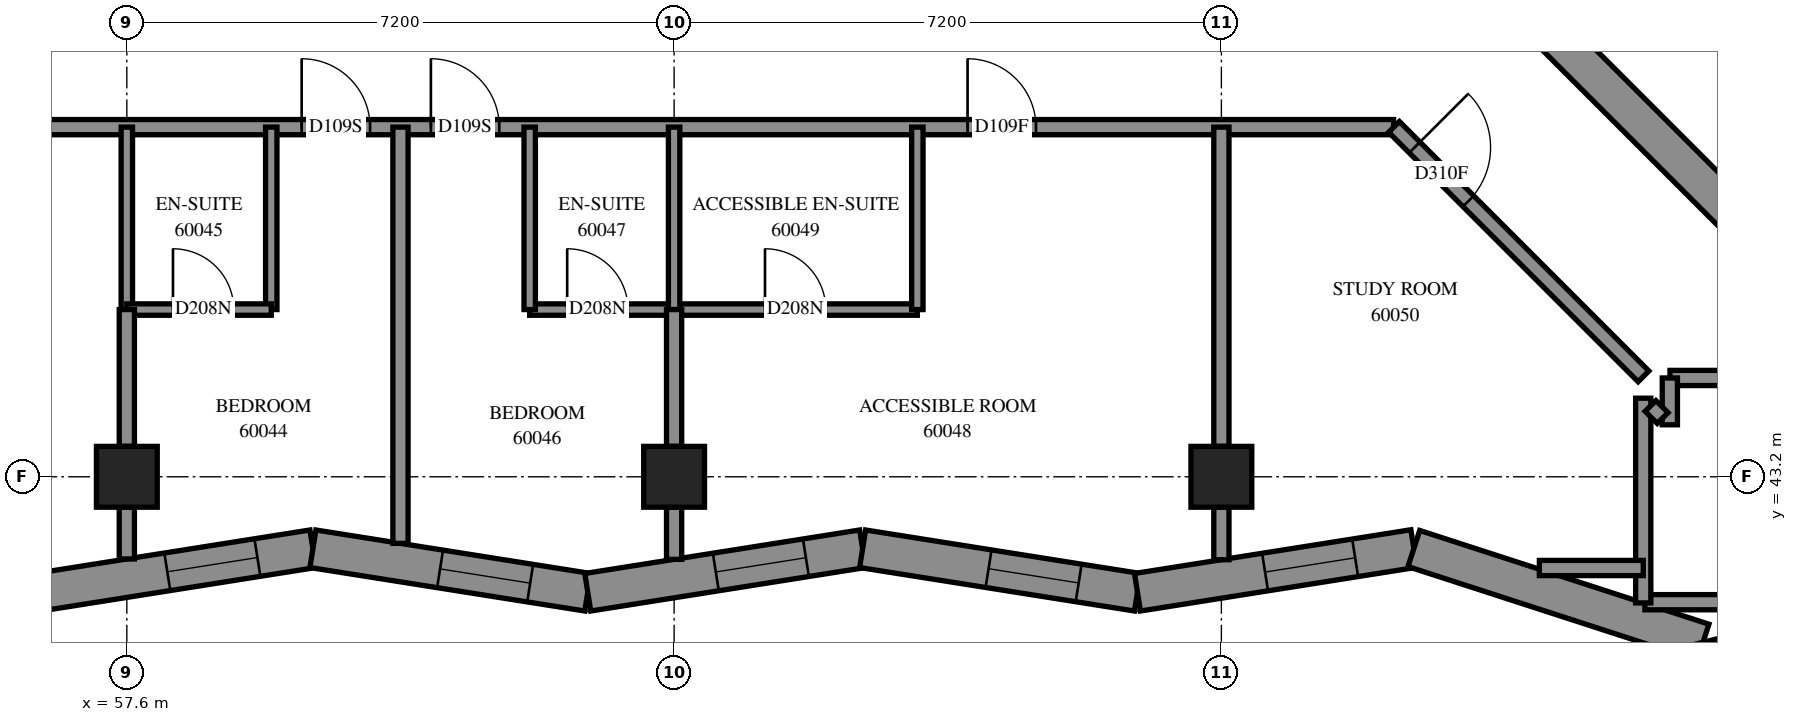
"""IFC4 building model, lengths in metres.
Left out: names, types, materials, properties, quantities, classifications, styles, units other than length and angle.
Written with IfcOpenShell. Run it as: python <this file> out.ifc"""

import sys

from ifc_helpers import new_model, si_unit, direction, frame, frame_2d, origin, origin_2d, place, context, subcontext, project, spatial, polyline, rectangle, outline, extrude, element, fill, save


model = new_model("IFC4")
c1 = context("Model", 3, precision=1e-05, world=origin(), true_north=direction((0.0, 1.0)))
c2 = subcontext(c1, "Body", "Model", "MODEL_VIEW")
j1 = project(units=[si_unit("LENGTHUNIT", "METRE"), si_unit("PLANEANGLEUNIT", "RADIAN")], contexts=[c1])
p1 = place(None, origin())
s1 = spatial("IfcSite", under=j1, at=p1, CompositionType="ELEMENT")
p2 = place(p1, origin())
s2 = spatial("IfcBuilding", under=s1, at=p2, CompositionType="ELEMENT")
p3 = place(p2, frame((0.0, 0.0, 220.2)))
s3 = spatial("IfcBuildingStorey", under=s2, at=p3, CompositionType="ELEMENT", Elevation=220.2)
for number, where, z_axis, x_axis in (
    (1, (57.6, 43.2, 0.0), (0.0, 0.0, 1.0), (1.0, 0.0, 0.0)),
    (2, (64.8, 43.2, 0.0), (0.0, 0.0, 1.0), (1.0, 0.0, 0.0)),
    (3, (72.0, 43.2, 0.0), (0.0, 0.0, 1.0), (1.0, 0.0, 0.0)),
):
    element("IfcColumn", number, at=place(p3, frame(where, z_axis=z_axis, x_axis=x_axis)), inside=s3, PredefinedType="COLUMN", context=c2, shape_type="SweptSolid", body=[
        extrude(rectangle(XDim=0.8, YDim=0.8, at=origin_2d()), origin(), (0.0, 0.0, 1.0), 3.1),
    ])
p4 = place(p3, frame((76.124, 49.267, -0.3), z_axis=(0.0, 0.0, 1.0), x_axis=(0.7071067812, -0.7071067812, 0.0)))
e4 = element("IfcWall", 4, at=p4, inside=s3, PredefinedType="SHEAR", context=c2, shape_type="SweptSolid", body=[
    extrude(rectangle(XDim=15.4, YDim=0.5, at=frame_2d((7.7, 0.0))), origin(), (0.0, 0.0, 1.0), 2.7),
])
p5 = place(p3, frame((56.432, 41.681, 0.0), z_axis=(0.0, 0.0, 1.0), x_axis=(0.9877186305, 0.156243102, 0.0)))
e5 = element("IfcWall", 5, at=p5, inside=s3, PredefinedType="SOLIDWALL", context=c2, shape_type="SweptSolid", body=[
    extrude(outline(polyline([(-0.04, -0.25), (3.621, -0.25), (3.7, 0.25), (0.04, 0.25), (-0.04, -0.25)])), origin(), (0.0, 0.0, 1.0), 3.1),
])
p6 = place(p5, frame((1.722, 0.0, 0.45)))
e6 = element("IfcOpeningElement", 6, at=p6, cuts=e5, PredefinedType="OPENING", context=c2, shape_type="SweptSolid", body=[
    extrude(rectangle(XDim=1.2, YDim=2.5, at=frame_2d((0.6, 1.25))), frame((0.0, 0.26, 0.0), z_axis=(0.0, -1.0, 0.0), x_axis=(1.0, 0.0, 0.0)), (0.0, 0.0, 1.0), 0.52),
])
p7 = place(p3, frame((60.048, 42.253, 0.0), z_axis=(0.0, 0.0, 1.0), x_axis=(0.9877179637, -0.1562473175, 0.0)))
e7 = element("IfcWall", 7, at=p7, inside=s3, PredefinedType="SOLIDWALL", context=c2, shape_type="SweptSolid", body=[
    extrude(outline(polyline([(0.04, -0.25), (3.7, -0.25), (3.621, 0.25), (-0.04, 0.25), (0.04, -0.25)])), origin(), (0.0, 0.0, 1.0), 3.1),
])
p8 = place(p7, frame((1.694, 0.0, 0.45)))
e8 = element("IfcOpeningElement", 8, at=p8, cuts=e7, PredefinedType="OPENING", context=c2, shape_type="SweptSolid", body=[
    extrude(rectangle(XDim=1.2, YDim=2.5, at=frame_2d((0.6, 1.25))), frame((0.0, 0.26, 0.0), z_axis=(0.0, -1.0, 0.0), x_axis=(1.0, 0.0, 0.0)), (0.0, 0.0, 1.0), 0.52),
])
p9 = place(p3, frame((63.664, 41.681, 0.0), z_axis=(0.0, 0.0, 1.0), x_axis=(0.9877186305, 0.156243102, 0.0)))
e9 = element("IfcWall", 9, at=p9, inside=s3, PredefinedType="SOLIDWALL", context=c2, shape_type="SweptSolid", body=[
    extrude(outline(polyline([(-0.04, -0.25), (3.621, -0.25), (3.7, 0.25), (0.04, 0.25), (-0.04, -0.25)])), origin(), (0.0, 0.0, 1.0), 3.1),
])
p10 = place(p9, frame((1.706, 0.0, 0.45)))
e10 = element("IfcOpeningElement", 10, at=p10, cuts=e9, PredefinedType="OPENING", context=c2, shape_type="SweptSolid", body=[
    extrude(rectangle(XDim=1.2, YDim=2.5, at=frame_2d((0.6, 1.25))), frame((0.0, 0.26, 0.0), z_axis=(0.0, -1.0, 0.0), x_axis=(1.0, 0.0, 0.0)), (0.0, 0.0, 1.0), 0.52),
])
p11 = place(p3, frame((67.28, 42.253, 0.0), z_axis=(0.0, 0.0, 1.0), x_axis=(0.9877186305, -0.156243102, 0.0)))
e11 = element("IfcWall", 11, at=p11, inside=s3, PredefinedType="SOLIDWALL", context=c2, shape_type="SweptSolid", body=[
    extrude(outline(polyline([(0.04, -0.25), (3.7, -0.25), (3.621, 0.25), (-0.04, 0.25), (0.04, -0.25)])), origin(), (0.0, 0.0, 1.0), 3.1),
])
p12 = place(p11, frame((1.678, 0.0, 0.45)))
e12 = element("IfcOpeningElement", 12, at=p12, cuts=e11, PredefinedType="OPENING", context=c2, shape_type="SweptSolid", body=[
    extrude(rectangle(XDim=1.2, YDim=2.5, at=frame_2d((0.6, 1.25))), frame((0.0, 0.26, 0.0), z_axis=(0.0, -1.0, 0.0), x_axis=(1.0, 0.0, 0.0)), (0.0, 0.0, 1.0), 0.52),
])
p13 = place(p3, frame((70.896, 41.681, 0.0), z_axis=(0.0, 0.0, 1.0), x_axis=(0.9877177726, 0.1562485253, 0.0)))
e13 = element("IfcWall", 13, at=p13, inside=s3, PredefinedType="SOLIDWALL", context=c2, shape_type="SweptSolid", body=[
    extrude(outline(polyline([(-0.04, -0.25), (3.621, -0.25), (3.741, 0.25), (0.04, 0.25), (-0.04, -0.25)])), origin(), (0.0, 0.0, 1.0), 3.1),
])
p14 = place(p13, frame((1.7, 0.0, 0.45)))
e14 = element("IfcOpeningElement", 14, at=p14, cuts=e13, PredefinedType="OPENING", context=c2, shape_type="SweptSolid", body=[
    extrude(rectangle(XDim=1.2, YDim=2.5, at=frame_2d((0.6, 1.25))), frame((0.0, 0.26, 0.0), z_axis=(0.0, -1.0, 0.0), x_axis=(1.0, 0.0, 0.0)), (0.0, 0.0, 1.0), 0.52),
])
p15 = place(p3, frame((74.532, 42.256, 0.0), z_axis=(0.0, 0.0, 1.0), x_axis=(0.9512828791, -0.308319451, 0.0)))
e15 = element("IfcWall", 15, at=p15, inside=s3, PredefinedType="SOLIDWALL", context=c2, shape_type="SweptSolid", body=[
    extrude(outline(polyline([(0.06, -0.25), (3.861, -0.25), (4.139, 0.25), (-0.06, 0.25), (0.06, -0.25)])), origin(), (0.0, 0.0, 1.0), 3.1),
])
p16 = place(p3, frame((78.337, 41.023, 0.0), z_axis=(0.0, 0.0, 1.0), x_axis=(0.2402739698, -0.9707051146, 0.0)))
e16 = element("IfcWall", 16, at=p16, inside=s3, PredefinedType="SOLIDWALL", context=c2, shape_type="SweptSolid", body=[
    extrude(outline(polyline([(0.139, -0.25), (4.786, -0.25), (4.497, 0.25), (-0.139, 0.25), (0.139, -0.25)])), origin(), (0.0, 0.0, 1.0), 3.1),
])
p17 = place(p16, frame((2.281, 0.0, 0.45)))
e17 = element("IfcOpeningElement", 17, at=p17, cuts=e16, PredefinedType="OPENING", context=c2, shape_type="SweptSolid", body=[
    extrude(rectangle(XDim=1.2, YDim=2.5, at=frame_2d((0.6, 1.25))), frame((0.0, 0.26, 0.0), z_axis=(0.0, -1.0, 0.0), x_axis=(1.0, 0.0, 0.0)), (0.0, 0.0, 1.0), 0.52),
])
p18 = place(p3, frame((55.0, 47.8, 0.0), z_axis=(0.0, 0.0, 1.0), x_axis=(1.0, 0.0, 0.0)))
e18 = element("IfcWall", 18, at=p18, inside=s3, PredefinedType="PARTITIONING", context=c2, shape_type="SweptSolid", body=[
    extrude(rectangle(XDim=19.266, YDim=0.2, at=frame_2d((9.633, 0.0))), origin(), (0.0, 0.0, 1.0), 3.1),
])
p19 = place(p18, frame((4.9, 0.0, 0.0)))
e19 = element("IfcOpeningElement", 19, at=p19, cuts=e18, PredefinedType="OPENING", context=c2, shape_type="SweptSolid", body=[
    extrude(rectangle(XDim=0.9, YDim=2.1, at=frame_2d((0.45, 1.05))), frame((0.0, 0.11, 0.0), z_axis=(0.0, -1.0, 0.0), x_axis=(1.0, 0.0, 0.0)), (0.0, 0.0, 1.0), 0.22),
])
p20 = place(p18, frame((6.6, 0.0, 0.0)))
e20 = element("IfcOpeningElement", 20, at=p20, cuts=e18, PredefinedType="OPENING", context=c2, shape_type="SweptSolid", body=[
    extrude(rectangle(XDim=0.9, YDim=2.1, at=frame_2d((0.45, 1.05))), frame((0.0, 0.11, 0.0), z_axis=(0.0, -1.0, 0.0), x_axis=(1.0, 0.0, 0.0)), (0.0, 0.0, 1.0), 0.22),
])
p21 = place(p18, frame((13.661, 0.0, 0.0)))
e21 = element("IfcOpeningElement", 21, at=p21, cuts=e18, PredefinedType="OPENING", context=c2, shape_type="SweptSolid", body=[
    extrude(rectangle(XDim=0.9, YDim=2.1, at=frame_2d((0.45, 1.05))), frame((0.0, 0.11, 0.0), z_axis=(0.0, -1.0, 0.0), x_axis=(1.0, 0.0, 0.0)), (0.0, 0.0, 1.0), 0.22),
])
p22 = place(p3, frame((61.2, 42.324, 0.0), z_axis=(0.0, 0.0, 1.0), x_axis=(0.0, 1.0, 0.0)))
e22 = element("IfcWall", 22, at=p22, inside=s3, PredefinedType="PARTITIONING", context=c2, shape_type="SweptSolid", body=[
    extrude(rectangle(XDim=5.476, YDim=0.2, at=frame_2d((2.738, 0.0))), origin(), (0.0, 0.0, 1.0), 3.1),
])
p23 = place(p3, frame((62.9, 45.4, 0.0), z_axis=(0.0, 0.0, 1.0), x_axis=(1.0, 0.0, 0.0)))
e23 = element("IfcWall", 23, at=p23, inside=s3, PredefinedType="PARTITIONING", context=c2, shape_type="SweptSolid", body=[
    extrude(rectangle(XDim=5.1, YDim=0.15, at=frame_2d((2.55, 0.0))), origin(), (0.0, 0.0, 1.0), 3.1),
])
p24 = place(p23, frame((0.493, 0.0, 0.0)))
e24 = element("IfcOpeningElement", 24, at=p24, cuts=e23, PredefinedType="OPENING", context=c2, shape_type="SweptSolid", body=[
    extrude(rectangle(XDim=0.8, YDim=2.1, at=frame_2d((0.4, 1.05))), frame((0.0, 0.085, 0.0), z_axis=(0.0, -1.0, 0.0), x_axis=(1.0, 0.0, 0.0)), (0.0, 0.0, 1.0), 0.17),
])
p25 = place(p23, frame((3.096, 0.0, 0.0)))
e25 = element("IfcOpeningElement", 25, at=p25, cuts=e23, PredefinedType="OPENING", context=c2, shape_type="SweptSolid", body=[
    extrude(rectangle(XDim=0.8, YDim=2.1, at=frame_2d((0.4, 1.05))), frame((0.0, 0.085, 0.0), z_axis=(0.0, -1.0, 0.0), x_axis=(1.0, 0.0, 0.0)), (0.0, 0.0, 1.0), 0.17),
])
p26 = place(p3, frame((74.272, 47.803, 0.0), z_axis=(0.0, 0.0, 1.0), x_axis=(0.7071067812, -0.7071067812, 0.0)))
e26 = element("IfcWall", 26, at=p26, inside=s3, PredefinedType="PARTITIONING", context=c2, shape_type="SweptSolid", body=[
    extrude(rectangle(XDim=4.641, YDim=0.2, at=frame_2d((2.321, 0.0))), origin(), (0.0, 0.0, 1.0), 3.1),
])
p27 = place(p26, frame((0.382, 0.0, 0.0)))
e27 = element("IfcOpeningElement", 27, at=p27, cuts=e26, PredefinedType="OPENING", context=c2, shape_type="SweptSolid", body=[
    extrude(rectangle(XDim=1.0, YDim=2.1, at=frame_2d((0.5, 1.05))), frame((0.0, 0.11, 0.0), z_axis=(0.0, -1.0, 0.0), x_axis=(1.0, 0.0, 0.0)), (0.0, 0.0, 1.0), 0.22),
])
p28 = place(p3, frame((72.0, 43.6, 0.0), z_axis=(0.0, 0.0, 1.0), x_axis=(0.0, 1.0, 0.0)))
e28 = element("IfcWall", 28, at=p28, inside=s3, PredefinedType="PARTITIONING", context=c2, shape_type="SweptSolid", body=[
    extrude(rectangle(XDim=4.2, YDim=0.2, at=frame_2d((2.1, 0.0))), origin(), (0.0, 0.0, 1.0), 3.1),
])
p29 = place(p3, frame((77.572, 41.55, 0.0), z_axis=(0.0, 0.0, 1.0), x_axis=(1.0, 0.0, 0.0)))
e29 = element("IfcWall", 29, at=p29, inside=s3, PredefinedType="PARTITIONING", context=c2, shape_type="SweptSolid", body=[
    extrude(rectangle(XDim=2.662, YDim=0.2, at=frame_2d((1.331, 0.0))), origin(), (0.0, 0.0, 1.0), 3.1),
])
p30 = place(p3, frame((77.55, 41.541, 0.0), z_axis=(0.0, 0.0, 1.0), x_axis=(0.0, 1.0, 0.0)))
e30 = element("IfcWall", 30, at=p30, inside=s3, PredefinedType="PARTITIONING", context=c2, shape_type="SweptSolid", body=[
    extrude(rectangle(XDim=2.693, YDim=0.2, at=frame_2d((1.347, 0.0))), origin(), (0.0, 0.0, 1.0), 3.1),
])
p31 = place(p3, frame((77.902, 44.5, 0.0), z_axis=(0.0, 0.0, 1.0), x_axis=(1.0, 0.0, 0.0)))
e31 = element("IfcWall", 31, at=p31, inside=s3, PredefinedType="PARTITIONING", context=c2, shape_type="SweptSolid", body=[
    extrude(rectangle(XDim=2.522, YDim=0.2, at=frame_2d((1.261, 0.0))), origin(), (0.0, 0.0, 1.0), 3.1),
])
for number, where, z_axis, x_axis in (
    (32, (59.5, 45.4, 0.0), (0.0, 0.0, 1.0), (0.0, 1.0, 0.0)),
    (33, (57.6, 45.4, 0.0), (0.0, 0.0, 1.0), (0.0, 1.0, 0.0)),
    (34, (62.9, 45.4, 0.0), (0.0, 0.0, 1.0), (0.0, 1.0, 0.0)),
    (35, (68.0, 45.4, 0.0), (0.0, 0.0, 1.0), (0.0, 1.0, 0.0)),
    (36, (64.8, 45.4, 0.0), (0.0, 0.0, 1.0), (0.0, 1.0, 0.0)),
):
    element("IfcWall", number, at=place(p3, frame(where, z_axis=z_axis, x_axis=x_axis)), inside=s3, PredefinedType="PARTITIONING", context=c2, shape_type="SweptSolid", body=[
        extrude(rectangle(XDim=2.4, YDim=0.15, at=frame_2d((1.2, 0.0))), origin(), (0.0, 0.0, 1.0), 3.1),
    ])
p32 = place(p3, frame((57.6, 45.4, 0.0), z_axis=(0.0, 0.0, 1.0), x_axis=(1.0, 0.0, 0.0)))
e37 = element("IfcWall", 37, at=p32, inside=s3, PredefinedType="PARTITIONING", context=c2, shape_type="SweptSolid", body=[
    extrude(rectangle(XDim=1.9, YDim=0.15, at=frame_2d((0.95, 0.0))), origin(), (0.0, 0.0, 1.0), 3.1),
])
p33 = place(p32, frame((0.607, 0.0, 0.0)))
e38 = element("IfcOpeningElement", 38, at=p33, cuts=e37, PredefinedType="OPENING", context=c2, shape_type="SweptSolid", body=[
    extrude(rectangle(XDim=0.8, YDim=2.1, at=frame_2d((0.4, 1.05))), frame((0.0, 0.085, 0.0), z_axis=(0.0, -1.0, 0.0), x_axis=(1.0, 0.0, 0.0)), (0.0, 0.0, 1.0), 0.17),
])
for number, where, z_axis, x_axis in (
    (39, (57.6, 43.6, 0.0), (0.0, 0.0, 1.0), (0.0, 1.0, 0.0)),
    (40, (64.8, 43.6, 0.0), (0.0, 0.0, 1.0), (0.0, 1.0, 0.0)),
):
    element("IfcWall", number, at=place(p3, frame(where, z_axis=z_axis, x_axis=x_axis)), inside=s3, PredefinedType="PARTITIONING", context=c2, shape_type="SweptSolid", body=[
        extrude(rectangle(XDim=1.8, YDim=0.2, at=frame_2d((0.9, 0.0))), origin(), (0.0, 0.0, 1.0), 3.1),
    ])
p34 = place(p3, frame((76.184, 42.0, 0.0), z_axis=(0.0, 0.0, 1.0), x_axis=(1.0, 0.0, 0.0)))
e41 = element("IfcWall", 41, at=p34, inside=s3, PredefinedType="PARTITIONING", context=c2, shape_type="SweptSolid", body=[
    extrude(rectangle(XDim=1.366, YDim=0.2, at=frame_2d((0.683, 0.0))), origin(), (0.0, 0.0, 1.0), 3.1),
])
p35 = place(p3, frame((72.0, 42.109, 0.0), z_axis=(0.0, 0.0, 1.0), x_axis=(0.0, 1.0, 0.0)))
e42 = element("IfcWall", 42, at=p35, inside=s3, PredefinedType="PARTITIONING", context=c2, shape_type="SweptSolid", body=[
    extrude(rectangle(XDim=0.691, YDim=0.2, at=frame_2d((0.346, 0.0))), origin(), (0.0, 0.0, 1.0), 3.1),
])
p36 = place(p3, frame((64.8, 42.114, 0.0), z_axis=(0.0, 0.0, 1.0), x_axis=(0.0, 1.0, 0.0)))
e43 = element("IfcWall", 43, at=p36, inside=s3, PredefinedType="PARTITIONING", context=c2, shape_type="SweptSolid", body=[
    extrude(rectangle(XDim=0.686, YDim=0.2, at=frame_2d((0.343, 0.0))), origin(), (0.0, 0.0, 1.0), 3.1),
])
p37 = place(p3, frame((57.6, 42.119, 0.0), z_axis=(0.0, 0.0, 1.0), x_axis=(0.0, 1.0, 0.0)))
e44 = element("IfcWall", 44, at=p37, inside=s3, PredefinedType="PARTITIONING", context=c2, shape_type="SweptSolid", body=[
    extrude(rectangle(XDim=0.681, YDim=0.2, at=frame_2d((0.341, 0.0))), origin(), (0.0, 0.0, 1.0), 3.1),
])
p38 = place(p3, frame((77.9, 43.884, 0.0), z_axis=(0.0, 0.0, 1.0), x_axis=(0.0, 1.0, 0.0)))
e45 = element("IfcWall", 45, at=p38, inside=s3, PredefinedType="PARTITIONING", context=c2, shape_type="SweptSolid", body=[
    extrude(rectangle(XDim=0.616, YDim=0.2, at=frame_2d((0.308, 0.0))), origin(), (0.0, 0.0, 1.0), 3.1),
])
p39 = place(p3, frame((77.646, 44.132, 0.0), z_axis=(0.0, 0.0, 1.0), x_axis=(0.7068844555, -0.707329037, 0.0)))
e46 = element("IfcWall", 46, at=p39, inside=s3, PredefinedType="PARTITIONING", context=c2, shape_type="SweptSolid", body=[
    extrude(rectangle(XDim=0.225, YDim=0.2, at=frame_2d((0.112, 0.0))), origin(), (0.0, 0.0, 1.0), 3.1),
])
p40 = place(p6, origin())
e47 = element("IfcWindow", 47, at=p40, inside=s3, PartitioningType="SINGLE_PANEL", PredefinedType="WINDOW", context=c2, shape_type="SweptSolid", body=[
    extrude(rectangle(XDim=1.2, YDim=2.5, at=frame_2d((0.6, 1.25))), frame((0.0, 0.18, 0.0), z_axis=(0.0, -1.0, 0.0), x_axis=(1.0, 0.0, 0.0)), (0.0, 0.0, 1.0), 0.06),
])
fill(e6, e47)
p41 = place(p8, origin())
e48 = element("IfcWindow", 48, at=p41, inside=s3, PartitioningType="SINGLE_PANEL", PredefinedType="WINDOW", context=c2, shape_type="SweptSolid", body=[
    extrude(rectangle(XDim=1.2, YDim=2.5, at=frame_2d((0.6, 1.25))), frame((0.0, 0.18, 0.0), z_axis=(0.0, -1.0, 0.0), x_axis=(1.0, 0.0, 0.0)), (0.0, 0.0, 1.0), 0.06),
])
fill(e8, e48)
p42 = place(p10, origin())
e49 = element("IfcWindow", 49, at=p42, inside=s3, PartitioningType="SINGLE_PANEL", PredefinedType="WINDOW", context=c2, shape_type="SweptSolid", body=[
    extrude(rectangle(XDim=1.2, YDim=2.5, at=frame_2d((0.6, 1.25))), frame((0.0, 0.18, 0.0), z_axis=(0.0, -1.0, 0.0), x_axis=(1.0, 0.0, 0.0)), (0.0, 0.0, 1.0), 0.06),
])
fill(e10, e49)
p43 = place(p12, origin())
e50 = element("IfcWindow", 50, at=p43, inside=s3, PartitioningType="SINGLE_PANEL", PredefinedType="WINDOW", context=c2, shape_type="SweptSolid", body=[
    extrude(rectangle(XDim=1.2, YDim=2.5, at=frame_2d((0.6, 1.25))), frame((0.0, 0.18, 0.0), z_axis=(0.0, -1.0, 0.0), x_axis=(1.0, 0.0, 0.0)), (0.0, 0.0, 1.0), 0.06),
])
fill(e12, e50)
p44 = place(p14, origin())
e51 = element("IfcWindow", 51, at=p44, inside=s3, PartitioningType="SINGLE_PANEL", PredefinedType="WINDOW", context=c2, shape_type="SweptSolid", body=[
    extrude(rectangle(XDim=1.2, YDim=2.5, at=frame_2d((0.6, 1.25))), frame((0.0, 0.18, 0.0), z_axis=(0.0, -1.0, 0.0), x_axis=(1.0, 0.0, 0.0)), (0.0, 0.0, 1.0), 0.06),
])
fill(e14, e51)
p45 = place(p19, origin())
e52 = element("IfcDoor", 52, at=p45, inside=s3, OperationType="SINGLE_SWING_LEFT", PredefinedType="DOOR", context=c2, shape_type="SweptSolid", body=[
    extrude(rectangle(XDim=0.9, YDim=2.1, at=frame_2d((0.45, 1.05))), frame((0.0, 0.025, 0.0), z_axis=(0.0, -1.0, 0.0), x_axis=(1.0, 0.0, 0.0)), (0.0, 0.0, 1.0), 0.05),
])
fill(e19, e52)
p46 = place(p33, origin())
e53 = element("IfcDoor", 53, at=p46, inside=s3, OperationType="SINGLE_SWING_RIGHT", PredefinedType="DOOR", context=c2, shape_type="SweptSolid", body=[
    extrude(rectangle(XDim=0.8, YDim=2.1, at=frame_2d((0.4, 1.05))), frame((0.0, 0.025, 0.0), z_axis=(0.0, -1.0, 0.0), x_axis=(1.0, 0.0, 0.0)), (0.0, 0.0, 1.0), 0.05),
])
fill(e38, e53)
p47 = place(p20, origin())
e54 = element("IfcDoor", 54, at=p47, inside=s3, OperationType="SINGLE_SWING_RIGHT", PredefinedType="DOOR", context=c2, shape_type="SweptSolid", body=[
    extrude(rectangle(XDim=0.9, YDim=2.1, at=frame_2d((0.45, 1.05))), frame((0.0, 0.025, 0.0), z_axis=(0.0, -1.0, 0.0), x_axis=(1.0, 0.0, 0.0)), (0.0, 0.0, 1.0), 0.05),
])
fill(e20, e54)
p48 = place(p24, origin())
e55 = element("IfcDoor", 55, at=p48, inside=s3, OperationType="SINGLE_SWING_RIGHT", PredefinedType="DOOR", context=c2, shape_type="SweptSolid", body=[
    extrude(rectangle(XDim=0.8, YDim=2.1, at=frame_2d((0.4, 1.05))), frame((0.0, 0.025, 0.0), z_axis=(0.0, -1.0, 0.0), x_axis=(1.0, 0.0, 0.0)), (0.0, 0.0, 1.0), 0.05),
])
fill(e24, e55)
p49 = place(p21, origin())
e56 = element("IfcDoor", 56, at=p49, inside=s3, OperationType="SINGLE_SWING_LEFT", PredefinedType="DOOR", context=c2, shape_type="SweptSolid", body=[
    extrude(rectangle(XDim=0.9, YDim=2.1, at=frame_2d((0.45, 1.05))), frame((0.0, 0.025, 0.0), z_axis=(0.0, -1.0, 0.0), x_axis=(1.0, 0.0, 0.0)), (0.0, 0.0, 1.0), 0.05),
])
fill(e21, e56)
p50 = place(p25, origin())
e57 = element("IfcDoor", 57, at=p50, inside=s3, OperationType="SINGLE_SWING_RIGHT", PredefinedType="DOOR", context=c2, shape_type="SweptSolid", body=[
    extrude(rectangle(XDim=0.8, YDim=2.1, at=frame_2d((0.4, 1.05))), frame((0.0, 0.025, 0.0), z_axis=(0.0, -1.0, 0.0), x_axis=(1.0, 0.0, 0.0)), (0.0, 0.0, 1.0), 0.05),
])
fill(e25, e57)
p51 = place(p27, origin())
e58 = element("IfcDoor", 58, at=p51, inside=s3, OperationType="SINGLE_SWING_LEFT", PredefinedType="DOOR", context=c2, shape_type="SweptSolid", body=[
    extrude(rectangle(XDim=1.0, YDim=2.1, at=frame_2d((0.5, 1.05))), frame((0.0, 0.025, 0.0), z_axis=(0.0, -1.0, 0.0), x_axis=(1.0, 0.0, 0.0)), (0.0, 0.0, 1.0), 0.05),
])
fill(e27, e58)
save(model, sys.argv[1])
